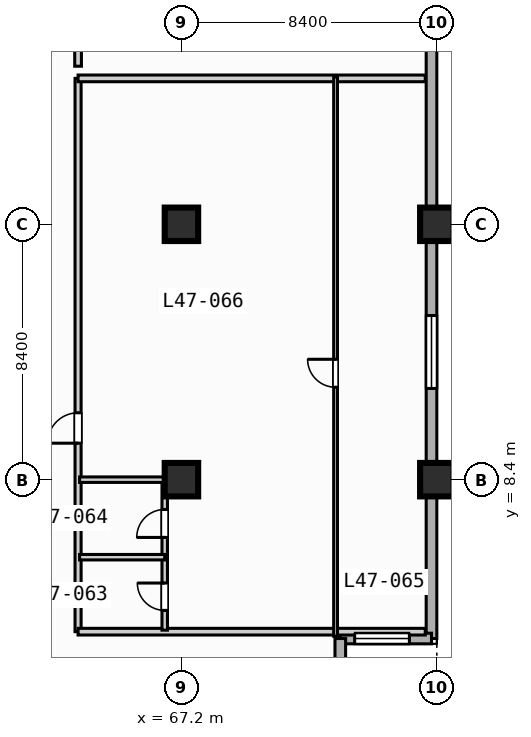
"""IFC4 building model, lengths in metres.
Left out: names, types, materials, properties, quantities, classifications, styles, units other than length and angle.
Written with IfcOpenShell. Run it as: python <this file> out.ifc"""

import sys

from ifc_helpers import new_model, si_unit, direction, frame, frame_2d, origin, origin_2d, place, context, subcontext, project, spatial, rectangle, extrude, element, fill, save


model = new_model("IFC4")
c1 = context("Model", 3, precision=1e-05, world=origin(), true_north=direction((0.0, 1.0)))
c2 = subcontext(c1, "Body", "Model", "MODEL_VIEW")
j1 = project(units=[si_unit("LENGTHUNIT", "METRE"), si_unit("PLANEANGLEUNIT", "RADIAN")], contexts=[c1])
p1 = place(None, origin())
s1 = spatial("IfcSite", under=j1, at=p1, CompositionType="ELEMENT")
p2 = place(p1, origin())
s2 = spatial("IfcBuilding", under=s1, at=p2, CompositionType="ELEMENT")
p3 = place(p2, frame((0.0, 0.0, 193.9)))
s3 = spatial("IfcBuildingStorey", under=s2, at=p3, CompositionType="ELEMENT", Elevation=193.9)
for number, where, z_axis, x_axis in (
    (1, (67.2, 8.4, 0.0), (0.0, 0.0, 1.0), (1.0, 0.0, 0.0)),
    (2, (67.2, 16.8, 0.0), (0.0, 0.0, 1.0), (1.0, 0.0, 0.0)),
    (3, (75.6, 8.4, 0.0), (0.0, 0.0, 1.0), (1.0, 0.0, 0.0)),
    (4, (75.6, 16.8, 0.0), (0.0, 0.0, 1.0), (1.0, 0.0, 0.0)),
):
    element("IfcColumn", number, at=place(p3, frame(where, z_axis=z_axis, x_axis=x_axis)), inside=s3, PredefinedType="COLUMN", context=c2, shape_type="SweptSolid", body=[
        extrude(rectangle(XDim=1.1, YDim=1.1, at=origin_2d()), origin(), (0.0, 0.0, 1.0), 3.7),
    ])
p4 = place(p3, frame((75.425, 30.425, 0.0), z_axis=(0.0, 0.0, 1.0), x_axis=(0.0, -1.0, 0.0)))
e5 = element("IfcWall", 5, at=p4, inside=s3, PredefinedType="STANDARD", context=c2, shape_type="SweptSolid", body=[
    extrude(rectangle(XDim=27.25, YDim=0.35, at=frame_2d((13.625, 0.0))), origin(), (0.0, 0.0, 1.0), 3.47),
])
p5 = place(p4, frame((16.625, 0.0, 0.85)))
e6 = element("IfcOpeningElement", 6, at=p5, cuts=e5, PredefinedType="OPENING", context=c2, shape_type="SweptSolid", body=[
    extrude(rectangle(XDim=2.4, YDim=1.95, at=frame_2d((1.2, 0.975))), frame((0.0, 0.185, 0.0), z_axis=(0.0, -1.0, 0.0), x_axis=(1.0, 0.0, 0.0)), (0.0, 0.0, 1.0), 0.37),
])
p6 = place(p3, frame((75.425, 3.175, 0.0), z_axis=(0.0, 0.0, 1.0), x_axis=(-1.0, 0.0, 0.0)))
e7 = element("IfcWall", 7, at=p6, inside=s3, PredefinedType="STANDARD", context=c2, shape_type="SweptSolid", body=[
    extrude(rectangle(XDim=3.0, YDim=0.35, at=frame_2d((1.5, 0.0))), origin(), (0.0, 0.0, 1.0), 3.47),
])
p7 = place(p6, frame((0.728, 0.0, 0.85)))
e8 = element("IfcOpeningElement", 8, at=p7, cuts=e7, PredefinedType="OPENING", context=c2, shape_type="SweptSolid", body=[
    extrude(rectangle(XDim=1.8, YDim=1.8, at=frame_2d((0.9, 0.9))), frame((0.0, 0.185, 0.0), z_axis=(0.0, -1.0, 0.0), x_axis=(1.0, 0.0, 0.0)), (0.0, 0.0, 1.0), 0.37),
])
p8 = place(p3, frame((72.425, 3.175, 0.0), z_axis=(0.0, 0.0, 1.0), x_axis=(0.0, -1.0, 0.0)))
e9 = element("IfcWall", 9, at=p8, inside=s3, PredefinedType="STANDARD", context=c2, shape_type="SweptSolid", body=[
    extrude(rectangle(XDim=3.0, YDim=0.35, at=frame_2d((1.5, 0.0))), origin(), (0.0, 0.0, 1.0), 3.47),
])
p9 = place(p3, frame((63.8, 3.4, 0.0), z_axis=(0.0, 0.0, 1.0), x_axis=(0.0, 1.0, 0.0)))
e10 = element("IfcWall", 10, at=p9, inside=s3, PredefinedType="PARTITIONING", context=c2, shape_type="SweptSolid", body=[
    extrude(rectangle(XDim=18.2, YDim=0.2, at=frame_2d((9.1, 0.0))), origin(), (0.0, 0.0, 1.0), 3.47),
])
p10 = place(p9, frame((6.2, 0.0, 0.0)))
e11 = element("IfcOpeningElement", 11, at=p10, cuts=e10, PredefinedType="OPENING", context=c2, shape_type="SweptSolid", body=[
    extrude(rectangle(XDim=1.0, YDim=2.15, at=frame_2d((0.5, 1.075))), frame((0.0, 0.11, 0.0), z_axis=(0.0, -1.0, 0.0), x_axis=(1.0, 0.0, 0.0)), (0.0, 0.0, 1.0), 0.22),
])
for number, where, z_axis, x_axis in (
    (12, (63.8, 3.4, 0.0), (0.0, 0.0, 1.0), (1.0, 0.0, 0.0)),
    (13, (63.8, 21.6, 0.0), (0.0, 0.0, 1.0), (1.0, 0.0, 0.0)),
):
    element("IfcWall", number, at=place(p3, frame(where, z_axis=z_axis, x_axis=x_axis)), inside=s3, PredefinedType="PARTITIONING", context=c2, shape_type="SweptSolid", body=[
        extrude(rectangle(XDim=11.42, YDim=0.22, at=frame_2d((5.71, 0.0))), origin(), (0.0, 0.0, 1.0), 3.47),
    ])
p11 = place(p3, frame((66.65, 3.45, 0.0), z_axis=(0.0, 0.0, 1.0), x_axis=(0.0, 1.0, 0.0)))
e14 = element("IfcWall", 14, at=p11, inside=s3, PredefinedType="PLUMBINGWALL", context=c2, shape_type="SweptSolid", body=[
    extrude(rectangle(XDim=4.95, YDim=0.18, at=frame_2d((2.475, 0.0))), origin(), (0.0, 0.0, 1.0), 3.47),
])
p12 = place(p11, frame((0.65, 0.0, 0.0)))
e15 = element("IfcOpeningElement", 15, at=p12, cuts=e14, PredefinedType="OPENING", context=c2, shape_type="SweptSolid", body=[
    extrude(rectangle(XDim=0.9, YDim=2.1, at=frame_2d((0.45, 1.05))), frame((0.0, 0.1, 0.0), z_axis=(0.0, -1.0, 0.0), x_axis=(1.0, 0.0, 0.0)), (0.0, 0.0, 1.0), 0.2),
])
p13 = place(p11, frame((3.05, 0.0, 0.0)))
e16 = element("IfcOpeningElement", 16, at=p13, cuts=e14, PredefinedType="OPENING", context=c2, shape_type="SweptSolid", body=[
    extrude(rectangle(XDim=0.92, YDim=2.1, at=frame_2d((0.46, 1.05))), frame((0.0, 0.1, 0.0), z_axis=(0.0, -1.0, 0.0), x_axis=(1.0, 0.0, 0.0)), (0.0, 0.0, 1.0), 0.2),
])
p14 = place(p3, frame((63.85, 5.85, 0.0), z_axis=(0.0, 0.0, 1.0), x_axis=(1.0, 0.0, 0.0)))
e17 = element("IfcWall", 17, at=p14, inside=s3, PredefinedType="PLUMBINGWALL", context=c2, shape_type="SweptSolid", body=[
    extrude(rectangle(XDim=2.8, YDim=0.18, at=frame_2d((1.4, 0.0))), origin(), (0.0, 0.0, 1.0), 3.47),
])
p15 = place(p3, frame((63.85, 8.4, 0.0), z_axis=(0.0, 0.0, 1.0), x_axis=(1.0, 0.0, 0.0)))
e18 = element("IfcWall", 18, at=p15, inside=s3, PredefinedType="PLUMBINGWALL", context=c2, shape_type="SweptSolid", body=[
    extrude(rectangle(XDim=2.8, YDim=0.18, at=frame_2d((1.4, 0.0))), origin(), (0.0, 0.0, 1.0), 3.116),
])
p16 = place(p3, frame((72.27, 3.25, 0.0), z_axis=(0.0, 0.0, 1.0), x_axis=(0.0, 1.0, 0.0)))
e19 = element("IfcWall", 19, at=p16, inside=s3, PredefinedType="PARTITIONING", context=c2, shape_type="SweptSolid", body=[
    extrude(rectangle(XDim=18.4, YDim=0.125, at=frame_2d((9.2, 0.0))), origin(), (0.0, 0.0, 1.0), 3.47),
])
p17 = place(p16, frame((8.19, 0.0, 0.0)))
e20 = element("IfcOpeningElement", 20, at=p17, cuts=e19, PredefinedType="OPENING", context=c2, shape_type="SweptSolid", body=[
    extrude(rectangle(XDim=0.92, YDim=2.1, at=frame_2d((0.46, 1.05))), frame((0.0, 0.073, 0.0), z_axis=(0.0, -1.0, 0.0), x_axis=(1.0, 0.0, 0.0)), (0.0, 0.0, 1.0), 0.145),
])
p18 = place(p3, frame((63.8, 22.0, 0.0), z_axis=(0.0, 0.0, 1.0), x_axis=(0.0, 1.0, 0.0)))
e21 = element("IfcWall", 21, at=p18, inside=s3, PredefinedType="PARTITIONING", context=c2, shape_type="SweptSolid", body=[
    extrude(rectangle(XDim=6.0, YDim=0.22, at=frame_2d((3.0, 0.0))), origin(), (0.0, 0.0, 1.0), 3.47),
])
p19 = place(p5, origin())
e22 = element("IfcWindow", 22, at=p19, inside=s3, PartitioningType="SINGLE_PANEL", PredefinedType="WINDOW", context=c2, shape_type="SweptSolid", body=[
    extrude(rectangle(XDim=2.4, YDim=1.95, at=frame_2d((1.2, 0.975))), frame((0.0, 0.03, 0.0), z_axis=(0.0, -1.0, 0.0), x_axis=(1.0, 0.0, 0.0)), (0.0, 0.0, 1.0), 0.06),
])
fill(e6, e22)
p20 = place(p7, origin())
e23 = element("IfcWindow", 23, at=p20, inside=s3, PartitioningType="SINGLE_PANEL", PredefinedType="WINDOW", context=c2, shape_type="SweptSolid", body=[
    extrude(rectangle(XDim=1.8, YDim=1.8, at=frame_2d((0.9, 0.9))), frame((0.0, 0.03, 0.0), z_axis=(0.0, -1.0, 0.0), x_axis=(1.0, 0.0, 0.0)), (0.0, 0.0, 1.0), 0.06),
])
fill(e8, e23)
p21 = place(p10, origin())
e24 = element("IfcDoor", 24, at=p21, inside=s3, OperationType="SINGLE_SWING_LEFT", PredefinedType="DOOR", context=c2, shape_type="SweptSolid", body=[
    extrude(rectangle(XDim=1.0, YDim=2.15, at=frame_2d((0.5, 1.075))), frame((0.0, 0.025, 0.0), z_axis=(0.0, -1.0, 0.0), x_axis=(1.0, 0.0, 0.0)), (0.0, 0.0, 1.0), 0.05),
])
fill(e11, e24)
p22 = place(p12, origin())
e25 = element("IfcDoor", 25, at=p22, inside=s3, OperationType="SINGLE_SWING_RIGHT", PredefinedType="DOOR", context=c2, shape_type="SweptSolid", body=[
    extrude(rectangle(XDim=0.9, YDim=2.1, at=frame_2d((0.45, 1.05))), frame((0.0, 0.025, 0.0), z_axis=(0.0, -1.0, 0.0), x_axis=(1.0, 0.0, 0.0)), (0.0, 0.0, 1.0), 0.05),
])
fill(e15, e25)
p23 = place(p13, origin())
e26 = element("IfcDoor", 26, at=p23, inside=s3, OperationType="SINGLE_SWING_LEFT", PredefinedType="DOOR", context=c2, shape_type="SweptSolid", body=[
    extrude(rectangle(XDim=0.92, YDim=2.1, at=frame_2d((0.46, 1.05))), frame((0.0, 0.025, 0.0), z_axis=(0.0, -1.0, 0.0), x_axis=(1.0, 0.0, 0.0)), (0.0, 0.0, 1.0), 0.05),
])
fill(e16, e26)
p24 = place(p17, origin())
e27 = element("IfcDoor", 27, at=p24, inside=s3, OperationType="SINGLE_SWING_RIGHT", PredefinedType="DOOR", context=c2, shape_type="SweptSolid", body=[
    extrude(rectangle(XDim=0.92, YDim=2.1, at=frame_2d((0.46, 1.05))), frame((0.0, 0.025, 0.0), z_axis=(0.0, -1.0, 0.0), x_axis=(1.0, 0.0, 0.0)), (0.0, 0.0, 1.0), 0.05),
])
fill(e20, e27)
save(model, sys.argv[1])
